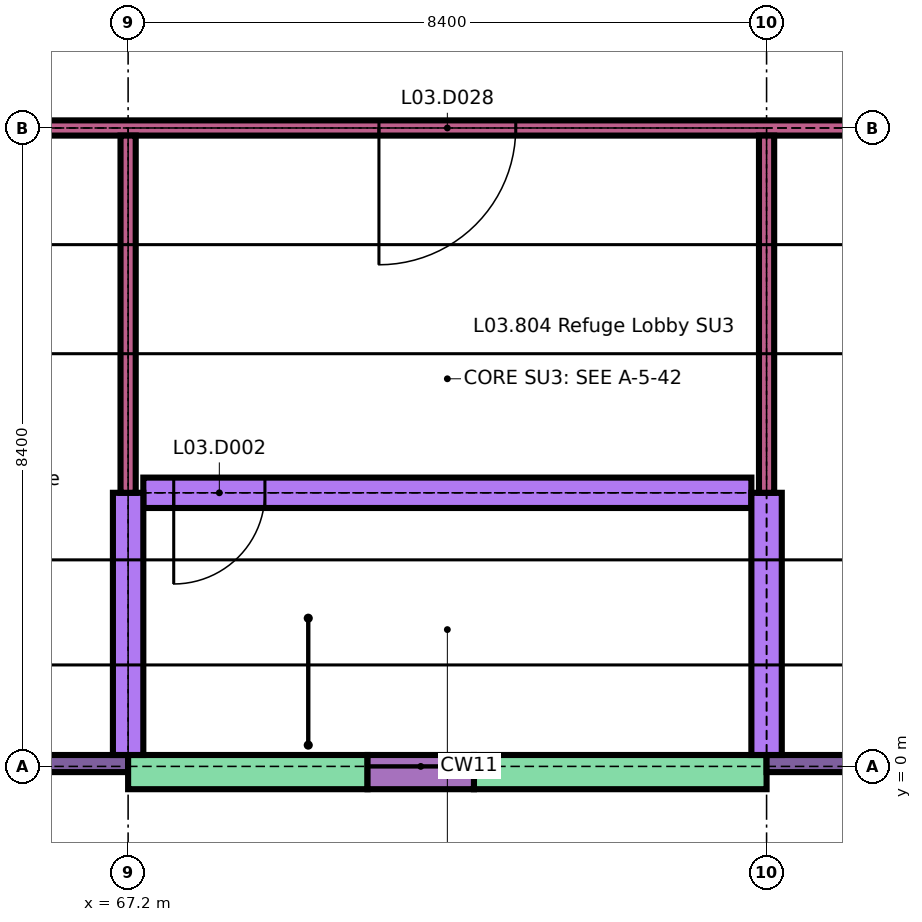
"""IFC4 building model, lengths in metres.
Left out: names, types, materials, properties, quantities, classifications, styles, units other than length and angle.
Written with IfcOpenShell. Run it as: python <this file> out.ifc"""

import sys

from ifc_helpers import new_model, si_unit, direction, frame, frame_2d, origin, place, context, subcontext, project, spatial, rectangle, extrude, element, fill, save


model = new_model("IFC4")
c1 = context("Model", 3, precision=1e-05, world=origin(), true_north=direction((0.0, 1.0)))
c2 = subcontext(c1, "Body", "Model", "MODEL_VIEW")
j1 = project(units=[si_unit("LENGTHUNIT", "METRE"), si_unit("PLANEANGLEUNIT", "RADIAN")], contexts=[c1])
p1 = place(None, origin())
s1 = spatial("IfcSite", under=j1, at=p1, CompositionType="ELEMENT")
p2 = place(p1, origin())
s2 = spatial("IfcBuilding", under=s1, at=p2, CompositionType="ELEMENT")
p3 = place(p2, frame((0.0, 0.0, 15.3)))
s3 = spatial("IfcBuildingStorey", under=s2, at=p3, CompositionType="ELEMENT", Elevation=15.3)
p4 = place(p3, frame((61.2, 0.038, 0.0), z_axis=(0.0, 0.0, 1.0), x_axis=(1.0, 0.0, 0.0)))
e1 = element("IfcWall", 1, at=p4, inside=s3, PredefinedType="SOLIDWALL", context=c2, shape_type="SweptSolid", body=[
    extrude(rectangle(XDim=6.0, YDim=0.225, at=frame_2d((3.0, 0.0))), origin(), (0.0, 0.0, 1.0), 4.0),
])
p5 = place(p4, frame((2.85, 0.0, 0.6)))
e2 = element("IfcOpeningElement", 2, at=p5, cuts=e1, PredefinedType="OPENING", context=c2, shape_type="SweptSolid", body=[
    extrude(rectangle(XDim=2.1, YDim=2.1, at=frame_2d((1.05, 1.05))), frame((0.0, 0.123, 0.0), z_axis=(0.0, -1.0, 0.0), x_axis=(1.0, 0.0, 0.0)), (0.0, 0.0, 1.0), 0.245),
])
p6 = place(p3, frame((67.2, -0.075, 0.0), z_axis=(0.0, 0.0, 1.0), x_axis=(1.0, 0.0, 0.0)))
e3 = element("IfcWall", 3, at=p6, inside=s3, PredefinedType="SOLIDWALL", context=c2, shape_type="SweptSolid", body=[
    extrude(rectangle(XDim=3.15, YDim=0.45, at=frame_2d((1.575, 0.0))), origin(), (0.0, 0.0, 1.0), 4.0),
])
p7 = place(p3, frame((71.75, -0.075, 0.0), z_axis=(0.0, 0.0, 1.0), x_axis=(1.0, 0.0, 0.0)))
e4 = element("IfcWall", 4, at=p7, inside=s3, PredefinedType="SOLIDWALL", context=c2, shape_type="SweptSolid", body=[
    extrude(rectangle(XDim=3.85, YDim=0.45, at=frame_2d((1.925, 0.0))), origin(), (0.0, 0.0, 1.0), 4.0),
])
p8 = place(p3, frame((70.35, -0.075, 0.0), z_axis=(0.0, 0.0, 1.0), x_axis=(1.0, 0.0, 0.0)))
e5 = element("IfcWall", 5, at=p8, inside=s3, PredefinedType="SOLIDWALL", context=c2, shape_type="SweptSolid", body=[
    extrude(rectangle(XDim=1.4, YDim=0.45, at=frame_2d((0.7, 0.0))), origin(), (0.0, 0.0, 1.0), 0.6),
])
p9 = place(p3, frame((75.6, 0.038, 0.0), z_axis=(0.0, 0.0, 1.0), x_axis=(1.0, 0.0, 0.0)))
e6 = element("IfcWall", 6, at=p9, inside=s3, PredefinedType="SOLIDWALL", context=c2, shape_type="SweptSolid", body=[
    extrude(rectangle(XDim=8.025, YDim=0.225, at=frame_2d((4.012, 0.0))), origin(), (0.0, 0.0, 1.0), 4.0),
])
p10 = place(p9, frame((1.05, 0.0, 0.6)))
e7 = element("IfcOpeningElement", 7, at=p10, cuts=e6, PredefinedType="OPENING", context=c2, shape_type="SweptSolid", body=[
    extrude(rectangle(XDim=2.1, YDim=2.1, at=frame_2d((1.05, 1.05))), frame((0.0, 0.123, 0.0), z_axis=(0.0, -1.0, 0.0), x_axis=(1.0, 0.0, 0.0)), (0.0, 0.0, 1.0), 0.245),
])
p11 = place(p9, frame((5.25, 0.0, 0.6)))
e8 = element("IfcOpeningElement", 8, at=p11, cuts=e6, PredefinedType="OPENING", context=c2, shape_type="SweptSolid", body=[
    extrude(rectangle(XDim=2.1, YDim=2.1, at=frame_2d((1.05, 1.05))), frame((0.0, 0.123, 0.0), z_axis=(0.0, -1.0, 0.0), x_axis=(1.0, 0.0, 0.0)), (0.0, 0.0, 1.0), 0.245),
])
p12 = place(p3, frame((42.21, 4.2, 4.904), z_axis=(0.0, 0.0, 1.0), x_axis=(1.0, 0.0, 0.0)))
e9 = element("IfcWall", 9, at=p12, inside=s3, PredefinedType="SOLIDWALL", context=c2, shape_type="SweptSolid", body=[
    extrude(rectangle(XDim=58.38, YDim=0.2, at=frame_2d((29.19, 0.0))), origin(), (0.0, 0.0, 1.0), 2.539),
])
p13 = place(p12, frame((1.05, 0.0, 0.3)))
e10 = element("IfcOpeningElement", 10, at=p13, cuts=e9, PredefinedType="OPENING", context=c2, shape_type="SweptSolid", body=[
    extrude(rectangle(XDim=2.1, YDim=1.8, at=frame_2d((1.05, 0.9))), frame((0.0, 0.11, 0.0), z_axis=(0.0, -1.0, 0.0), x_axis=(1.0, 0.0, 0.0)), (0.0, 0.0, 1.0), 0.22),
])
p14 = place(p12, frame((5.25, 0.0, 0.3)))
e11 = element("IfcOpeningElement", 11, at=p14, cuts=e9, PredefinedType="OPENING", context=c2, shape_type="SweptSolid", body=[
    extrude(rectangle(XDim=2.1, YDim=1.8, at=frame_2d((1.05, 0.9))), frame((0.0, 0.11, 0.0), z_axis=(0.0, -1.0, 0.0), x_axis=(1.0, 0.0, 0.0)), (0.0, 0.0, 1.0), 0.22),
])
p15 = place(p12, frame((9.45, 0.0, 0.3)))
e12 = element("IfcOpeningElement", 12, at=p15, cuts=e9, PredefinedType="OPENING", context=c2, shape_type="SweptSolid", body=[
    extrude(rectangle(XDim=2.1, YDim=1.8, at=frame_2d((1.05, 0.9))), frame((0.0, 0.11, 0.0), z_axis=(0.0, -1.0, 0.0), x_axis=(1.0, 0.0, 0.0)), (0.0, 0.0, 1.0), 0.22),
])
p16 = place(p12, frame((13.65, 0.0, 0.3)))
e13 = element("IfcOpeningElement", 13, at=p16, cuts=e9, PredefinedType="OPENING", context=c2, shape_type="SweptSolid", body=[
    extrude(rectangle(XDim=2.1, YDim=1.8, at=frame_2d((1.05, 0.9))), frame((0.0, 0.11, 0.0), z_axis=(0.0, -1.0, 0.0), x_axis=(1.0, 0.0, 0.0)), (0.0, 0.0, 1.0), 0.22),
])
p17 = place(p12, frame((17.85, 0.0, 0.3)))
e14 = element("IfcOpeningElement", 14, at=p17, cuts=e9, PredefinedType="OPENING", context=c2, shape_type="SweptSolid", body=[
    extrude(rectangle(XDim=2.1, YDim=1.8, at=frame_2d((1.05, 0.9))), frame((0.0, 0.11, 0.0), z_axis=(0.0, -1.0, 0.0), x_axis=(1.0, 0.0, 0.0)), (0.0, 0.0, 1.0), 0.22),
])
p18 = place(p12, frame((22.05, 0.0, 0.3)))
e15 = element("IfcOpeningElement", 15, at=p18, cuts=e9, PredefinedType="OPENING", context=c2, shape_type="SweptSolid", body=[
    extrude(rectangle(XDim=2.1, YDim=1.8, at=frame_2d((1.05, 0.9))), frame((0.0, 0.11, 0.0), z_axis=(0.0, -1.0, 0.0), x_axis=(1.0, 0.0, 0.0)), (0.0, 0.0, 1.0), 0.22),
])
p19 = place(p12, frame((26.25, 0.0, 0.3)))
e16 = element("IfcOpeningElement", 16, at=p19, cuts=e9, PredefinedType="OPENING", context=c2, shape_type="SweptSolid", body=[
    extrude(rectangle(XDim=2.1, YDim=1.8, at=frame_2d((1.05, 0.9))), frame((0.0, 0.11, 0.0), z_axis=(0.0, -1.0, 0.0), x_axis=(1.0, 0.0, 0.0)), (0.0, 0.0, 1.0), 0.22),
])
p20 = place(p12, frame((30.45, 0.0, 0.3)))
e17 = element("IfcOpeningElement", 17, at=p20, cuts=e9, PredefinedType="OPENING", context=c2, shape_type="SweptSolid", body=[
    extrude(rectangle(XDim=2.1, YDim=1.8, at=frame_2d((1.05, 0.9))), frame((0.0, 0.11, 0.0), z_axis=(0.0, -1.0, 0.0), x_axis=(1.0, 0.0, 0.0)), (0.0, 0.0, 1.0), 0.22),
])
p21 = place(p12, frame((34.65, 0.0, 0.3)))
e18 = element("IfcOpeningElement", 18, at=p21, cuts=e9, PredefinedType="OPENING", context=c2, shape_type="SweptSolid", body=[
    extrude(rectangle(XDim=2.1, YDim=1.8, at=frame_2d((1.05, 0.9))), frame((0.0, 0.11, 0.0), z_axis=(0.0, -1.0, 0.0), x_axis=(1.0, 0.0, 0.0)), (0.0, 0.0, 1.0), 0.22),
])
p22 = place(p12, frame((38.85, 0.0, 0.3)))
e19 = element("IfcOpeningElement", 19, at=p22, cuts=e9, PredefinedType="OPENING", context=c2, shape_type="SweptSolid", body=[
    extrude(rectangle(XDim=2.1, YDim=1.8, at=frame_2d((1.05, 0.9))), frame((0.0, 0.11, 0.0), z_axis=(0.0, -1.0, 0.0), x_axis=(1.0, 0.0, 0.0)), (0.0, 0.0, 1.0), 0.22),
])
p23 = place(p12, frame((43.05, 0.0, 0.3)))
e20 = element("IfcOpeningElement", 20, at=p23, cuts=e9, PredefinedType="OPENING", context=c2, shape_type="SweptSolid", body=[
    extrude(rectangle(XDim=2.1, YDim=1.8, at=frame_2d((1.05, 0.9))), frame((0.0, 0.11, 0.0), z_axis=(0.0, -1.0, 0.0), x_axis=(1.0, 0.0, 0.0)), (0.0, 0.0, 1.0), 0.22),
])
p24 = place(p12, frame((47.25, 0.0, 0.3)))
e21 = element("IfcOpeningElement", 21, at=p24, cuts=e9, PredefinedType="OPENING", context=c2, shape_type="SweptSolid", body=[
    extrude(rectangle(XDim=2.1, YDim=1.8, at=frame_2d((1.05, 0.9))), frame((0.0, 0.11, 0.0), z_axis=(0.0, -1.0, 0.0), x_axis=(1.0, 0.0, 0.0)), (0.0, 0.0, 1.0), 0.22),
])
p25 = place(p12, frame((51.45, 0.0, 0.3)))
e22 = element("IfcOpeningElement", 22, at=p25, cuts=e9, PredefinedType="OPENING", context=c2, shape_type="SweptSolid", body=[
    extrude(rectangle(XDim=2.1, YDim=1.8, at=frame_2d((1.05, 0.9))), frame((0.0, 0.11, 0.0), z_axis=(0.0, -1.0, 0.0), x_axis=(1.0, 0.0, 0.0)), (0.0, 0.0, 1.0), 0.22),
])
p26 = place(p12, frame((55.65, 0.0, 0.3)))
e23 = element("IfcOpeningElement", 23, at=p26, cuts=e9, PredefinedType="OPENING", context=c2, shape_type="SweptSolid", body=[
    extrude(rectangle(XDim=2.1, YDim=1.8, at=frame_2d((1.05, 0.9))), frame((0.0, 0.11, 0.0), z_axis=(0.0, -1.0, 0.0), x_axis=(1.0, 0.0, 0.0)), (0.0, 0.0, 1.0), 0.22),
])
p27 = place(p3, frame((42.21, 8.4, 4.904), z_axis=(0.0, 0.0, 1.0), x_axis=(1.0, 0.0, 0.0)))
e24 = element("IfcWall", 24, at=p27, inside=s3, PredefinedType="SOLIDWALL", context=c2, shape_type="SweptSolid", body=[
    extrude(rectangle(XDim=58.38, YDim=0.2, at=frame_2d((29.19, 0.0))), origin(), (0.0, 0.0, 1.0), 2.539),
])
p28 = place(p27, frame((1.05, 0.0, 0.3)))
e25 = element("IfcOpeningElement", 25, at=p28, cuts=e24, PredefinedType="OPENING", context=c2, shape_type="SweptSolid", body=[
    extrude(rectangle(XDim=2.1, YDim=1.8, at=frame_2d((1.05, 0.9))), frame((0.0, 0.11, 0.0), z_axis=(0.0, -1.0, 0.0), x_axis=(1.0, 0.0, 0.0)), (0.0, 0.0, 1.0), 0.22),
])
p29 = place(p27, frame((5.25, 0.0, 0.3)))
e26 = element("IfcOpeningElement", 26, at=p29, cuts=e24, PredefinedType="OPENING", context=c2, shape_type="SweptSolid", body=[
    extrude(rectangle(XDim=2.1, YDim=1.8, at=frame_2d((1.05, 0.9))), frame((0.0, 0.11, 0.0), z_axis=(0.0, -1.0, 0.0), x_axis=(1.0, 0.0, 0.0)), (0.0, 0.0, 1.0), 0.22),
])
p30 = place(p27, frame((9.45, 0.0, 0.3)))
e27 = element("IfcOpeningElement", 27, at=p30, cuts=e24, PredefinedType="OPENING", context=c2, shape_type="SweptSolid", body=[
    extrude(rectangle(XDim=2.1, YDim=1.8, at=frame_2d((1.05, 0.9))), frame((0.0, 0.11, 0.0), z_axis=(0.0, -1.0, 0.0), x_axis=(1.0, 0.0, 0.0)), (0.0, 0.0, 1.0), 0.22),
])
p31 = place(p27, frame((13.65, 0.0, 0.3)))
e28 = element("IfcOpeningElement", 28, at=p31, cuts=e24, PredefinedType="OPENING", context=c2, shape_type="SweptSolid", body=[
    extrude(rectangle(XDim=2.1, YDim=1.8, at=frame_2d((1.05, 0.9))), frame((0.0, 0.11, 0.0), z_axis=(0.0, -1.0, 0.0), x_axis=(1.0, 0.0, 0.0)), (0.0, 0.0, 1.0), 0.22),
])
p32 = place(p27, frame((17.85, 0.0, 0.3)))
e29 = element("IfcOpeningElement", 29, at=p32, cuts=e24, PredefinedType="OPENING", context=c2, shape_type="SweptSolid", body=[
    extrude(rectangle(XDim=2.1, YDim=1.8, at=frame_2d((1.05, 0.9))), frame((0.0, 0.11, 0.0), z_axis=(0.0, -1.0, 0.0), x_axis=(1.0, 0.0, 0.0)), (0.0, 0.0, 1.0), 0.22),
])
p33 = place(p27, frame((22.05, 0.0, 0.3)))
e30 = element("IfcOpeningElement", 30, at=p33, cuts=e24, PredefinedType="OPENING", context=c2, shape_type="SweptSolid", body=[
    extrude(rectangle(XDim=2.1, YDim=1.8, at=frame_2d((1.05, 0.9))), frame((0.0, 0.11, 0.0), z_axis=(0.0, -1.0, 0.0), x_axis=(1.0, 0.0, 0.0)), (0.0, 0.0, 1.0), 0.22),
])
p34 = place(p27, frame((26.25, 0.0, 0.3)))
e31 = element("IfcOpeningElement", 31, at=p34, cuts=e24, PredefinedType="OPENING", context=c2, shape_type="SweptSolid", body=[
    extrude(rectangle(XDim=2.1, YDim=1.8, at=frame_2d((1.05, 0.9))), frame((0.0, 0.11, 0.0), z_axis=(0.0, -1.0, 0.0), x_axis=(1.0, 0.0, 0.0)), (0.0, 0.0, 1.0), 0.22),
])
p35 = place(p27, frame((30.45, 0.0, 0.3)))
e32 = element("IfcOpeningElement", 32, at=p35, cuts=e24, PredefinedType="OPENING", context=c2, shape_type="SweptSolid", body=[
    extrude(rectangle(XDim=2.1, YDim=1.8, at=frame_2d((1.05, 0.9))), frame((0.0, 0.11, 0.0), z_axis=(0.0, -1.0, 0.0), x_axis=(1.0, 0.0, 0.0)), (0.0, 0.0, 1.0), 0.22),
])
p36 = place(p27, frame((34.65, 0.0, 0.3)))
e33 = element("IfcOpeningElement", 33, at=p36, cuts=e24, PredefinedType="OPENING", context=c2, shape_type="SweptSolid", body=[
    extrude(rectangle(XDim=2.1, YDim=1.8, at=frame_2d((1.05, 0.9))), frame((0.0, 0.11, 0.0), z_axis=(0.0, -1.0, 0.0), x_axis=(1.0, 0.0, 0.0)), (0.0, 0.0, 1.0), 0.22),
])
p37 = place(p27, frame((38.85, 0.0, 0.3)))
e34 = element("IfcOpeningElement", 34, at=p37, cuts=e24, PredefinedType="OPENING", context=c2, shape_type="SweptSolid", body=[
    extrude(rectangle(XDim=2.1, YDim=1.8, at=frame_2d((1.05, 0.9))), frame((0.0, 0.11, 0.0), z_axis=(0.0, -1.0, 0.0), x_axis=(1.0, 0.0, 0.0)), (0.0, 0.0, 1.0), 0.22),
])
p38 = place(p27, frame((43.05, 0.0, 0.3)))
e35 = element("IfcOpeningElement", 35, at=p38, cuts=e24, PredefinedType="OPENING", context=c2, shape_type="SweptSolid", body=[
    extrude(rectangle(XDim=2.1, YDim=1.8, at=frame_2d((1.05, 0.9))), frame((0.0, 0.11, 0.0), z_axis=(0.0, -1.0, 0.0), x_axis=(1.0, 0.0, 0.0)), (0.0, 0.0, 1.0), 0.22),
])
p39 = place(p27, frame((47.25, 0.0, 0.3)))
e36 = element("IfcOpeningElement", 36, at=p39, cuts=e24, PredefinedType="OPENING", context=c2, shape_type="SweptSolid", body=[
    extrude(rectangle(XDim=2.1, YDim=1.8, at=frame_2d((1.05, 0.9))), frame((0.0, 0.11, 0.0), z_axis=(0.0, -1.0, 0.0), x_axis=(1.0, 0.0, 0.0)), (0.0, 0.0, 1.0), 0.22),
])
p40 = place(p27, frame((51.45, 0.0, 0.3)))
e37 = element("IfcOpeningElement", 37, at=p40, cuts=e24, PredefinedType="OPENING", context=c2, shape_type="SweptSolid", body=[
    extrude(rectangle(XDim=2.1, YDim=1.8, at=frame_2d((1.05, 0.9))), frame((0.0, 0.11, 0.0), z_axis=(0.0, -1.0, 0.0), x_axis=(1.0, 0.0, 0.0)), (0.0, 0.0, 1.0), 0.22),
])
p41 = place(p27, frame((55.65, 0.0, 0.3)))
e38 = element("IfcOpeningElement", 38, at=p41, cuts=e24, PredefinedType="OPENING", context=c2, shape_type="SweptSolid", body=[
    extrude(rectangle(XDim=2.1, YDim=1.8, at=frame_2d((1.05, 0.9))), frame((0.0, 0.11, 0.0), z_axis=(0.0, -1.0, 0.0), x_axis=(1.0, 0.0, 0.0)), (0.0, 0.0, 1.0), 0.22),
])
p42 = place(p3, frame((67.4, 3.6, 0.0), z_axis=(0.0, 0.0, 1.0), x_axis=(1.0, 0.0, 0.0)))
e39 = element("IfcWall", 39, at=p42, inside=s3, PredefinedType="SHEAR", context=c2, shape_type="SweptSolid", body=[
    extrude(rectangle(XDim=8.0, YDim=0.4, at=frame_2d((4.0, 0.0))), origin(), (0.0, 0.0, 1.0), 4.0),
])
p43 = place(p42, frame((0.4, 0.0, 0.0)))
e40 = element("IfcOpeningElement", 40, at=p43, cuts=e39, PredefinedType="OPENING", context=c2, shape_type="SweptSolid", body=[
    extrude(rectangle(XDim=1.2, YDim=2.1, at=frame_2d((0.6, 1.05))), frame((0.0, 0.21, 0.0), z_axis=(0.0, -1.0, 0.0), x_axis=(1.0, 0.0, 0.0)), (0.0, 0.0, 1.0), 0.42),
])
p44 = place(p3, frame((59.175, 8.4, 0.0), z_axis=(0.0, 0.0, 1.0), x_axis=(1.0, 0.0, 0.0)))
e41 = element("IfcWall", 41, at=p44, inside=s3, PredefinedType="PARTITIONING", context=c2, shape_type="SweptSolid", body=[
    extrude(rectangle(XDim=24.45, YDim=0.2, at=frame_2d((12.225, 0.0))), origin(), (0.0, 0.0, 1.0), 4.0),
])
p45 = place(p44, frame((4.325, 0.0, 0.0)))
e42 = element("IfcOpeningElement", 42, at=p45, cuts=e41, PredefinedType="OPENING", context=c2, shape_type="SweptSolid", body=[
    extrude(rectangle(XDim=1.4, YDim=2.1, at=frame_2d((0.7, 1.05))), frame((0.0, 0.11, 0.0), z_axis=(0.0, -1.0, 0.0), x_axis=(1.0, 0.0, 0.0)), (0.0, 0.0, 1.0), 0.22),
])
p46 = place(p44, frame((11.325, 0.0, 0.0)))
e43 = element("IfcOpeningElement", 43, at=p46, cuts=e41, PredefinedType="OPENING", context=c2, shape_type="SweptSolid", body=[
    extrude(rectangle(XDim=1.8, YDim=2.4, at=frame_2d((0.9, 1.2))), frame((0.0, 0.11, 0.0), z_axis=(0.0, -1.0, 0.0), x_axis=(1.0, 0.0, 0.0)), (0.0, 0.0, 1.0), 0.22),
])
p47 = place(p44, frame((19.738, 0.0, 0.0)))
e44 = element("IfcOpeningElement", 44, at=p47, cuts=e41, PredefinedType="OPENING", context=c2, shape_type="SweptSolid", body=[
    extrude(rectangle(XDim=1.4, YDim=2.1, at=frame_2d((0.7, 1.05))), frame((0.0, 0.11, 0.0), z_axis=(0.0, -1.0, 0.0), x_axis=(1.0, 0.0, 0.0)), (0.0, 0.0, 1.0), 0.22),
])
p48 = place(p3, frame((67.2, 0.15, 0.0), z_axis=(0.0, 0.0, 1.0), x_axis=(0.0, 1.0, 0.0)))
e45 = element("IfcWall", 45, at=p48, inside=s3, PredefinedType="SHEAR", context=c2, shape_type="SweptSolid", body=[
    extrude(rectangle(XDim=3.45, YDim=0.4, at=frame_2d((1.725, 0.0))), origin(), (0.0, 0.0, 1.0), 4.0),
])
p49 = place(p3, frame((67.2, 3.6, 0.0), z_axis=(0.0, 0.0, 1.0), x_axis=(0.0, 1.0, 0.0)))
e46 = element("IfcWall", 46, at=p49, inside=s3, PredefinedType="PARTITIONING", context=c2, shape_type="SweptSolid", body=[
    extrude(rectangle(XDim=4.7, YDim=0.2, at=frame_2d((2.35, 0.0))), origin(), (0.0, 0.0, 1.0), 4.0),
])
p50 = place(p3, frame((75.6, 0.15, 0.0), z_axis=(0.0, 0.0, 1.0), x_axis=(0.0, 1.0, 0.0)))
e47 = element("IfcWall", 47, at=p50, inside=s3, PredefinedType="SHEAR", context=c2, shape_type="SweptSolid", body=[
    extrude(rectangle(XDim=3.45, YDim=0.4, at=frame_2d((1.725, 0.0))), origin(), (0.0, 0.0, 1.0), 4.0),
])
p51 = place(p3, frame((75.6, 3.6, 0.0), z_axis=(0.0, 0.0, 1.0), x_axis=(0.0, 1.0, 0.0)))
e48 = element("IfcWall", 48, at=p51, inside=s3, PredefinedType="PARTITIONING", context=c2, shape_type="SweptSolid", body=[
    extrude(rectangle(XDim=4.7, YDim=0.2, at=frame_2d((2.35, 0.0))), origin(), (0.0, 0.0, 1.0), 4.0),
])
p52 = place(p18, origin())
e49 = element("IfcWindow", 49, at=p52, inside=s3, PartitioningType="SINGLE_PANEL", PredefinedType="WINDOW", context=c2, shape_type="SweptSolid", body=[
    extrude(rectangle(XDim=2.1, YDim=1.8, at=frame_2d((1.05, 0.9))), frame((0.0, 0.075, 0.0), z_axis=(0.0, -1.0, 0.0), x_axis=(1.0, 0.0, 0.0)), (0.0, 0.0, 1.0), 0.15),
])
fill(e15, e49)
p53 = place(p19, origin())
e50 = element("IfcWindow", 50, at=p53, inside=s3, PartitioningType="SINGLE_PANEL", PredefinedType="WINDOW", context=c2, shape_type="SweptSolid", body=[
    extrude(rectangle(XDim=2.1, YDim=1.8, at=frame_2d((1.05, 0.9))), frame((0.0, 0.075, 0.0), z_axis=(0.0, -1.0, 0.0), x_axis=(1.0, 0.0, 0.0)), (0.0, 0.0, 1.0), 0.15),
])
fill(e16, e50)
p54 = place(p20, origin())
e51 = element("IfcWindow", 51, at=p54, inside=s3, PartitioningType="SINGLE_PANEL", PredefinedType="WINDOW", context=c2, shape_type="SweptSolid", body=[
    extrude(rectangle(XDim=2.1, YDim=1.8, at=frame_2d((1.05, 0.9))), frame((0.0, 0.075, 0.0), z_axis=(0.0, -1.0, 0.0), x_axis=(1.0, 0.0, 0.0)), (0.0, 0.0, 1.0), 0.15),
])
fill(e17, e51)
p55 = place(p33, origin())
e52 = element("IfcWindow", 52, at=p55, inside=s3, PartitioningType="SINGLE_PANEL", PredefinedType="WINDOW", context=c2, shape_type="SweptSolid", body=[
    extrude(rectangle(XDim=2.1, YDim=1.8, at=frame_2d((1.05, 0.9))), frame((0.0, 0.075, 0.0), z_axis=(0.0, -1.0, 0.0), x_axis=(1.0, 0.0, 0.0)), (0.0, 0.0, 1.0), 0.15),
])
fill(e30, e52)
p56 = place(p34, origin())
e53 = element("IfcWindow", 53, at=p56, inside=s3, PartitioningType="SINGLE_PANEL", PredefinedType="WINDOW", context=c2, shape_type="SweptSolid", body=[
    extrude(rectangle(XDim=2.1, YDim=1.8, at=frame_2d((1.05, 0.9))), frame((0.0, 0.075, 0.0), z_axis=(0.0, -1.0, 0.0), x_axis=(1.0, 0.0, 0.0)), (0.0, 0.0, 1.0), 0.15),
])
fill(e31, e53)
p57 = place(p35, origin())
e54 = element("IfcWindow", 54, at=p57, inside=s3, PartitioningType="SINGLE_PANEL", PredefinedType="WINDOW", context=c2, shape_type="SweptSolid", body=[
    extrude(rectangle(XDim=2.1, YDim=1.8, at=frame_2d((1.05, 0.9))), frame((0.0, 0.075, 0.0), z_axis=(0.0, -1.0, 0.0), x_axis=(1.0, 0.0, 0.0)), (0.0, 0.0, 1.0), 0.15),
])
fill(e32, e54)
p58 = place(p43, origin())
e55 = element("IfcDoor", 55, at=p58, inside=s3, OperationType="SINGLE_SWING_LEFT", PredefinedType="DOOR", context=c2, shape_type="SweptSolid", body=[
    extrude(rectangle(XDim=1.2, YDim=2.1, at=frame_2d((0.6, 1.05))), frame((0.0, 0.025, 0.0), z_axis=(0.0, -1.0, 0.0), x_axis=(1.0, 0.0, 0.0)), (0.0, 0.0, 1.0), 0.05),
])
fill(e40, e55)
p59 = place(p46, origin())
e56 = element("IfcDoor", 56, at=p59, inside=s3, OperationType="SINGLE_SWING_LEFT", PredefinedType="DOOR", context=c2, shape_type="SweptSolid", body=[
    extrude(rectangle(XDim=1.8, YDim=2.4, at=frame_2d((0.9, 1.2))), frame((0.0, 0.03, 0.0), z_axis=(0.0, -1.0, 0.0), x_axis=(1.0, 0.0, 0.0)), (0.0, 0.0, 1.0), 0.06),
])
fill(e43, e56)
save(model, sys.argv[1])
